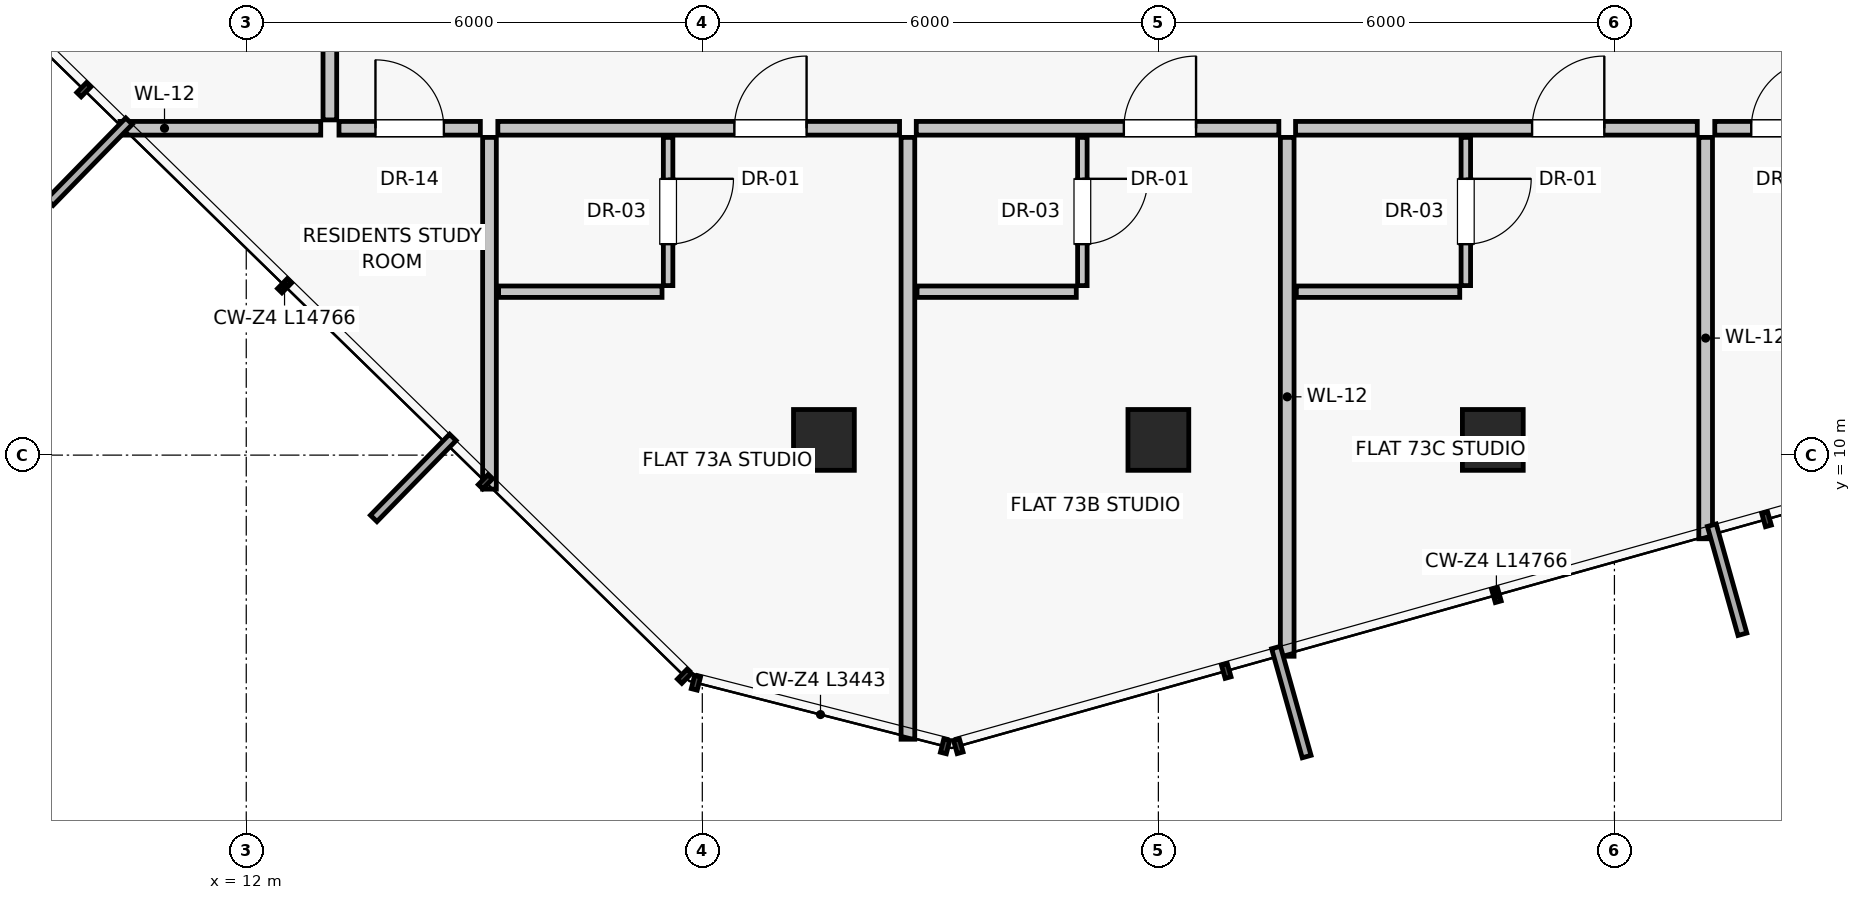
"""IFC4 building model, lengths in metres.
Left out: names, types, materials, properties, quantities, classifications, styles, units other than length and angle.
Written with IfcOpenShell. Run it as: python <this file> out.ifc"""

import sys

from ifc_helpers import new_model, si_unit, direction, frame, frame_2d, origin, origin_2d, place, context, subcontext, project, spatial, rectangle, extrude, source, transform, mapped, element, fill, save


model = new_model("IFC4")
c1 = context("Model", 3, precision=1e-05, world=origin(), true_north=direction((0.0, 1.0)))
c2 = subcontext(c1, "Body", "Model", "MODEL_VIEW")
j1 = project(units=[si_unit("LENGTHUNIT", "METRE"), si_unit("PLANEANGLEUNIT", "RADIAN")], contexts=[c1])
p1 = place(None, origin())
s1 = spatial("IfcSite", under=j1, at=p1, CompositionType="ELEMENT")
p2 = place(p1, origin())
s2 = spatial("IfcBuilding", under=s1, at=p2, CompositionType="ELEMENT")
p3 = place(p2, frame((0.0, 0.0, 257.75)))
s3 = spatial("IfcBuildingStorey", under=s2, at=p3, CompositionType="ELEMENT", Elevation=257.75)
for number, where, z_axis, x_axis in (
    (1, (19.6, 10.2, 0.0), (0.0, 0.0, 1.0), (1.0, 0.0, 0.0)),
    (2, (24.0, 10.2, 0.0), (0.0, 0.0, 1.0), (1.0, 0.0, 0.0)),
    (3, (28.4, 10.2, 0.0), (0.0, 0.0, 1.0), (1.0, 0.0, 0.0)),
):
    element("IfcColumn", number, at=place(p3, frame(where, z_axis=z_axis, x_axis=x_axis)), inside=s3, PredefinedType="COLUMN", context=c2, shape_type="SweptSolid", body=[
        extrude(rectangle(XDim=0.8, YDim=0.8, at=origin_2d()), origin(), (0.0, 0.0, 1.0), 3.25),
    ])
p4 = place(p3, frame((15.2, 14.18, 0.0), z_axis=(0.0, 0.0, 1.0), x_axis=(0.0, -1.0, 0.0)))
e4 = element("IfcWall", 4, at=p4, inside=s3, PredefinedType="PARTITIONING", context=c2, shape_type="SweptSolid", body=[
    extrude(rectangle(XDim=4.627, YDim=0.18, at=frame_2d((2.313, 0.0))), origin(), (0.0, 0.0, 1.0), 3.015),
])
p5 = place(p3, frame((31.2, 14.18, 0.0), z_axis=(0.0, 0.0, 1.0), x_axis=(0.0, -1.0, 0.0)))
e5 = element("IfcWall", 5, at=p5, inside=s3, PredefinedType="PARTITIONING", context=c2, shape_type="SweptSolid", body=[
    extrude(rectangle(XDim=5.281, YDim=0.18, at=frame_2d((2.64, 0.0))), origin(), (0.0, 0.0, 1.0), 3.015),
])
p6 = place(p3, frame((15.31, 14.3, 0.0), z_axis=(0.0, 0.0, 1.0), x_axis=(1.0, 0.0, 0.0)))
e6 = element("IfcWall", 6, at=p6, inside=s3, PredefinedType="PARTITIONING", context=c2, shape_type="SweptSolid", body=[
    extrude(rectangle(XDim=5.285, YDim=0.18, at=frame_2d((2.643, 0.0))), origin(), (0.0, 0.0, 1.0), 3.015),
])
p7 = place(p6, frame((3.112, 0.0, 0.0)))
e7 = element("IfcOpeningElement", 7, at=p7, cuts=e6, PredefinedType="OPENING", context=c2, shape_type="SweptSolid", body=[
    extrude(rectangle(XDim=0.95, YDim=2.02, at=frame_2d((0.475, 1.01))), frame((0.0, 0.1, 0.0), z_axis=(0.0, -1.0, 0.0), x_axis=(1.0, 0.0, 0.0)), (0.0, 0.0, 1.0), 0.2),
])
p8 = place(p3, frame((17.55, 14.18, 0.0), z_axis=(0.0, 0.0, 1.0), x_axis=(0.0, -1.0, 0.0)))
e8 = element("IfcWall", 8, at=p8, inside=s3, PredefinedType="PARTITIONING", context=c2, shape_type="SweptSolid", body=[
    extrude(rectangle(XDim=1.95, YDim=0.125, at=frame_2d((0.975, 0.0))), origin(), (0.0, 0.0, 1.0), 3.015),
])
p9 = place(p8, frame((0.545, 0.0, 0.0)))
e9 = element("IfcOpeningElement", 9, at=p9, cuts=e8, PredefinedType="OPENING", context=c2, shape_type="SweptSolid", body=[
    extrude(rectangle(XDim=0.86, YDim=2.01, at=frame_2d((0.43, 1.005))), frame((0.0, 0.073, 0.0), z_axis=(0.0, -1.0, 0.0), x_axis=(1.0, 0.0, 0.0)), (0.0, 0.0, 1.0), 0.145),
])
p10 = place(p3, frame((15.32, 12.15, 0.0), z_axis=(0.0, 0.0, 1.0), x_axis=(1.0, 0.0, 0.0)))
e10 = element("IfcWall", 10, at=p10, inside=s3, PredefinedType="PARTITIONING", context=c2, shape_type="SweptSolid", body=[
    extrude(rectangle(XDim=2.15, YDim=0.15, at=frame_2d((1.075, 0.0))), origin(), (0.0, 0.0, 1.0), 3.015),
])
p11 = place(p3, frame((20.705, 14.18, 0.0), z_axis=(0.0, 0.0, 1.0), x_axis=(0.0, -1.0, 0.0)))
e11 = element("IfcWall", 11, at=p11, inside=s3, PredefinedType="PARTITIONING", context=c2, shape_type="SweptSolid", body=[
    extrude(rectangle(XDim=7.918, YDim=0.18, at=frame_2d((3.959, 0.0))), origin(), (0.0, 0.0, 1.0), 2.543),
])
p12 = place(p3, frame((20.815, 14.3, 0.0), z_axis=(0.0, 0.0, 1.0), x_axis=(1.0, 0.0, 0.0)))
e12 = element("IfcWall", 12, at=p12, inside=s3, PredefinedType="PARTITIONING", context=c2, shape_type="SweptSolid", body=[
    extrude(rectangle(XDim=4.77, YDim=0.18, at=frame_2d((2.385, 0.0))), origin(), (0.0, 0.0, 1.0), 3.015),
])
p13 = place(p12, frame((2.731, 0.0, 0.0)))
e13 = element("IfcOpeningElement", 13, at=p13, cuts=e12, PredefinedType="OPENING", context=c2, shape_type="SweptSolid", body=[
    extrude(rectangle(XDim=0.95, YDim=2.02, at=frame_2d((0.475, 1.01))), frame((0.0, 0.1, 0.0), z_axis=(0.0, -1.0, 0.0), x_axis=(1.0, 0.0, 0.0)), (0.0, 0.0, 1.0), 0.2),
])
p14 = place(p3, frame((23.0, 14.18, 0.0), z_axis=(0.0, 0.0, 1.0), x_axis=(0.0, -1.0, 0.0)))
e14 = element("IfcWall", 14, at=p14, inside=s3, PredefinedType="PARTITIONING", context=c2, shape_type="SweptSolid", body=[
    extrude(rectangle(XDim=1.95, YDim=0.125, at=frame_2d((0.975, 0.0))), origin(), (0.0, 0.0, 1.0), 3.015),
])
p15 = place(p14, frame((0.545, 0.0, 0.0)))
e15 = element("IfcOpeningElement", 15, at=p15, cuts=e14, PredefinedType="OPENING", context=c2, shape_type="SweptSolid", body=[
    extrude(rectangle(XDim=0.86, YDim=2.01, at=frame_2d((0.43, 1.005))), frame((0.0, 0.073, 0.0), z_axis=(0.0, -1.0, 0.0), x_axis=(1.0, 0.0, 0.0)), (0.0, 0.0, 1.0), 0.145),
])
p16 = place(p3, frame((20.825, 12.15, 0.0), z_axis=(0.0, 0.0, 1.0), x_axis=(1.0, 0.0, 0.0)))
e16 = element("IfcWall", 16, at=p16, inside=s3, PredefinedType="PARTITIONING", context=c2, shape_type="SweptSolid", body=[
    extrude(rectangle(XDim=2.095, YDim=0.15, at=frame_2d((1.047, 0.0))), origin(), (0.0, 0.0, 1.0), 3.015),
])
p17 = place(p3, frame((25.695, 14.18, 0.0), z_axis=(0.0, 0.0, 1.0), x_axis=(0.0, -1.0, 0.0)))
e17 = element("IfcWall", 17, at=p17, inside=s3, PredefinedType="PARTITIONING", context=c2, shape_type="SweptSolid", body=[
    extrude(rectangle(XDim=6.826, YDim=0.18, at=frame_2d((3.413, 0.0))), origin(), (0.0, 0.0, 1.0), 3.015),
])
p18 = place(p3, frame((25.805, 14.3, 0.0), z_axis=(0.0, 0.0, 1.0), x_axis=(1.0, 0.0, 0.0)))
e18 = element("IfcWall", 18, at=p18, inside=s3, PredefinedType="PARTITIONING", context=c2, shape_type="SweptSolid", body=[
    extrude(rectangle(XDim=5.285, YDim=0.18, at=frame_2d((2.643, 0.0))), origin(), (0.0, 0.0, 1.0), 3.015),
])
p19 = place(p18, frame((3.112, 0.0, 0.0)))
e19 = element("IfcOpeningElement", 19, at=p19, cuts=e18, PredefinedType="OPENING", context=c2, shape_type="SweptSolid", body=[
    extrude(rectangle(XDim=0.95, YDim=2.02, at=frame_2d((0.475, 1.01))), frame((0.0, 0.1, 0.0), z_axis=(0.0, -1.0, 0.0), x_axis=(1.0, 0.0, 0.0)), (0.0, 0.0, 1.0), 0.2),
])
p20 = place(p3, frame((28.045, 14.18, 0.0), z_axis=(0.0, 0.0, 1.0), x_axis=(0.0, -1.0, 0.0)))
e20 = element("IfcWall", 20, at=p20, inside=s3, PredefinedType="PARTITIONING", context=c2, shape_type="SweptSolid", body=[
    extrude(rectangle(XDim=1.95, YDim=0.125, at=frame_2d((0.975, 0.0))), origin(), (0.0, 0.0, 1.0), 3.015),
])
p21 = place(p20, frame((0.545, 0.0, 0.0)))
e21 = element("IfcOpeningElement", 21, at=p21, cuts=e20, PredefinedType="OPENING", context=c2, shape_type="SweptSolid", body=[
    extrude(rectangle(XDim=0.86, YDim=2.01, at=frame_2d((0.43, 1.005))), frame((0.0, 0.073, 0.0), z_axis=(0.0, -1.0, 0.0), x_axis=(1.0, 0.0, 0.0)), (0.0, 0.0, 1.0), 0.145),
])
p22 = place(p3, frame((25.815, 12.15, 0.0), z_axis=(0.0, 0.0, 1.0), x_axis=(1.0, 0.0, 0.0)))
e22 = element("IfcWall", 22, at=p22, inside=s3, PredefinedType="PARTITIONING", context=c2, shape_type="SweptSolid", body=[
    extrude(rectangle(XDim=2.15, YDim=0.15, at=frame_2d((1.075, 0.0))), origin(), (0.0, 0.0, 1.0), 3.015),
])
p23 = place(p3, frame((12.98, 14.3, 0.0), z_axis=(0.0, 0.0, 1.0), x_axis=(-1.0, 0.0, 0.0)))
e23 = element("IfcWall", 23, at=p23, inside=s3, PredefinedType="PARTITIONING", context=c2, shape_type="SweptSolid", body=[
    extrude(rectangle(XDim=2.641, YDim=0.18, at=frame_2d((1.321, 0.0))), origin(), (0.0, 0.0, 1.0), 3.015),
])
p24 = place(p3, frame((13.1, 14.41, 0.0), z_axis=(0.0, 0.0, 1.0), x_axis=(0.0, 1.0, 0.0)))
e24 = element("IfcWall", 24, at=p24, inside=s3, PredefinedType="PARTITIONING", context=c2, shape_type="SweptSolid", body=[
    extrude(rectangle(XDim=4.224, YDim=0.18, at=frame_2d((2.112, 0.0))), origin(), (0.0, 0.0, 1.0), 2.662),
])
p25 = place(p24, frame((1.612, 0.0, 0.0)))
e25 = element("IfcOpeningElement", 25, at=p25, cuts=e24, PredefinedType="OPENING", context=c2, shape_type="SweptSolid", body=[
    extrude(rectangle(XDim=1.0, YDim=2.01, at=frame_2d((0.5, 1.005))), frame((0.0, 0.1, 0.0), z_axis=(0.0, -1.0, 0.0), x_axis=(1.0, 0.0, 0.0)), (0.0, 0.0, 1.0), 0.2),
])
p26 = place(p3, frame((13.22, 14.3, 0.0), z_axis=(0.0, 0.0, 1.0), x_axis=(1.0, 0.0, 0.0)))
e26 = element("IfcWall", 26, at=p26, inside=s3, PredefinedType="PARTITIONING", context=c2, shape_type="SweptSolid", body=[
    extrude(rectangle(XDim=1.86, YDim=0.18, at=frame_2d((0.93, 0.0))), origin(), (0.0, 0.0, 1.0), 3.015),
])
p27 = place(p26, frame((0.48, 0.0, 0.0)))
e27 = element("IfcOpeningElement", 27, at=p27, cuts=e26, PredefinedType="OPENING", context=c2, shape_type="SweptSolid", body=[
    extrude(rectangle(XDim=0.9, YDim=2.01, at=frame_2d((0.45, 1.005))), frame((0.0, 0.1, 0.0), z_axis=(0.0, -1.0, 0.0), x_axis=(1.0, 0.0, 0.0)), (0.0, 0.0, 1.0), 0.2),
])
p28 = place(p3, frame((31.32, 14.3, 0.0), z_axis=(0.0, 0.0, 1.0), x_axis=(1.0, 0.0, 0.0)))
e28 = element("IfcWall", 28, at=p28, inside=s3, PredefinedType="PARTITIONING", context=c2, shape_type="SweptSolid", body=[
    extrude(rectangle(XDim=1.86, YDim=0.18, at=frame_2d((0.93, 0.0))), origin(), (0.0, 0.0, 1.0), 3.015),
])
p29 = place(p28, frame((0.48, 0.0, 0.0)))
e29 = element("IfcOpeningElement", 29, at=p29, cuts=e28, PredefinedType="OPENING", context=c2, shape_type="SweptSolid", body=[
    extrude(rectangle(XDim=0.9, YDim=2.01, at=frame_2d((0.45, 1.005))), frame((0.0, 0.1, 0.0), z_axis=(0.0, -1.0, 0.0), x_axis=(1.0, 0.0, 0.0)), (0.0, 0.0, 1.0), 0.2),
])
m1 = source(origin(), c2, "Body", "SweptSolid", [
    extrude(rectangle(XDim=0.95, YDim=2.02, at=frame_2d((0.475, 1.01))), frame((0.0, 0.025, 0.0), z_axis=(0.0, -1.0, 0.0), x_axis=(1.0, 0.0, 0.0)), (0.0, 0.0, 1.0), 0.05),
])
p30 = place(p7, origin())
e30 = element("IfcDoor", 30, at=p30, inside=s3, OperationType="SINGLE_SWING_RIGHT", PredefinedType="DOOR", context=c2, shape_type="MappedRepresentation", body=[
    mapped(m1, transform((0.0, 0.0, 0.0), scale=1.0)),
])
fill(e7, e30)
m2 = source(origin(), c2, "Body", "SweptSolid", [
    extrude(rectangle(XDim=0.86, YDim=2.01, at=frame_2d((0.43, 1.005))), frame((0.0, 0.025, 0.0), z_axis=(0.0, -1.0, 0.0), x_axis=(1.0, 0.0, 0.0)), (0.0, 0.0, 1.0), 0.05),
])
p31 = place(p9, origin())
e31 = element("IfcDoor", 31, at=p31, inside=s3, OperationType="SINGLE_SWING_LEFT", PredefinedType="DOOR", context=c2, shape_type="MappedRepresentation", body=[
    mapped(m2, transform((0.0, 0.0, 0.0), scale=1.0)),
])
fill(e9, e31)
p32 = place(p13, origin())
e32 = element("IfcDoor", 32, at=p32, inside=s3, OperationType="SINGLE_SWING_RIGHT", PredefinedType="DOOR", context=c2, shape_type="MappedRepresentation", body=[
    mapped(m1, transform((0.0, 0.0, 0.0), scale=1.0)),
])
fill(e13, e32)
p33 = place(p15, origin())
e33 = element("IfcDoor", 33, at=p33, inside=s3, OperationType="SINGLE_SWING_LEFT", PredefinedType="DOOR", context=c2, shape_type="MappedRepresentation", body=[
    mapped(m2, transform((0.0, 0.0, 0.0), scale=1.0)),
])
fill(e15, e33)
p34 = place(p19, origin())
e34 = element("IfcDoor", 34, at=p34, inside=s3, OperationType="SINGLE_SWING_RIGHT", PredefinedType="DOOR", context=c2, shape_type="MappedRepresentation", body=[
    mapped(m1, transform((0.0, 0.0, 0.0), scale=1.0)),
])
fill(e19, e34)
p35 = place(p21, origin())
e35 = element("IfcDoor", 35, at=p35, inside=s3, OperationType="SINGLE_SWING_LEFT", PredefinedType="DOOR", context=c2, shape_type="MappedRepresentation", body=[
    mapped(m2, transform((0.0, 0.0, 0.0), scale=1.0)),
])
fill(e21, e35)
m3 = source(origin(), c2, "Body", "SweptSolid", [
    extrude(rectangle(XDim=0.9, YDim=2.01, at=frame_2d((0.45, 1.005))), frame((0.0, 0.025, 0.0), z_axis=(0.0, -1.0, 0.0), x_axis=(1.0, 0.0, 0.0)), (0.0, 0.0, 1.0), 0.05),
])
p36 = place(p27, origin())
e36 = element("IfcDoor", 36, at=p36, inside=s3, OperationType="SINGLE_SWING_LEFT", PredefinedType="DOOR", context=c2, shape_type="MappedRepresentation", body=[
    mapped(m3, transform((0.0, 0.0, 0.0), scale=1.0)),
])
fill(e27, e36)
p37 = place(p29, origin())
e37 = element("IfcDoor", 37, at=p37, inside=s3, OperationType="SINGLE_SWING_RIGHT", PredefinedType="DOOR", context=c2, shape_type="MappedRepresentation", body=[
    mapped(m3, transform((0.0, 0.0, 0.0), scale=1.0)),
])
fill(e29, e37)
save(model, sys.argv[1])
